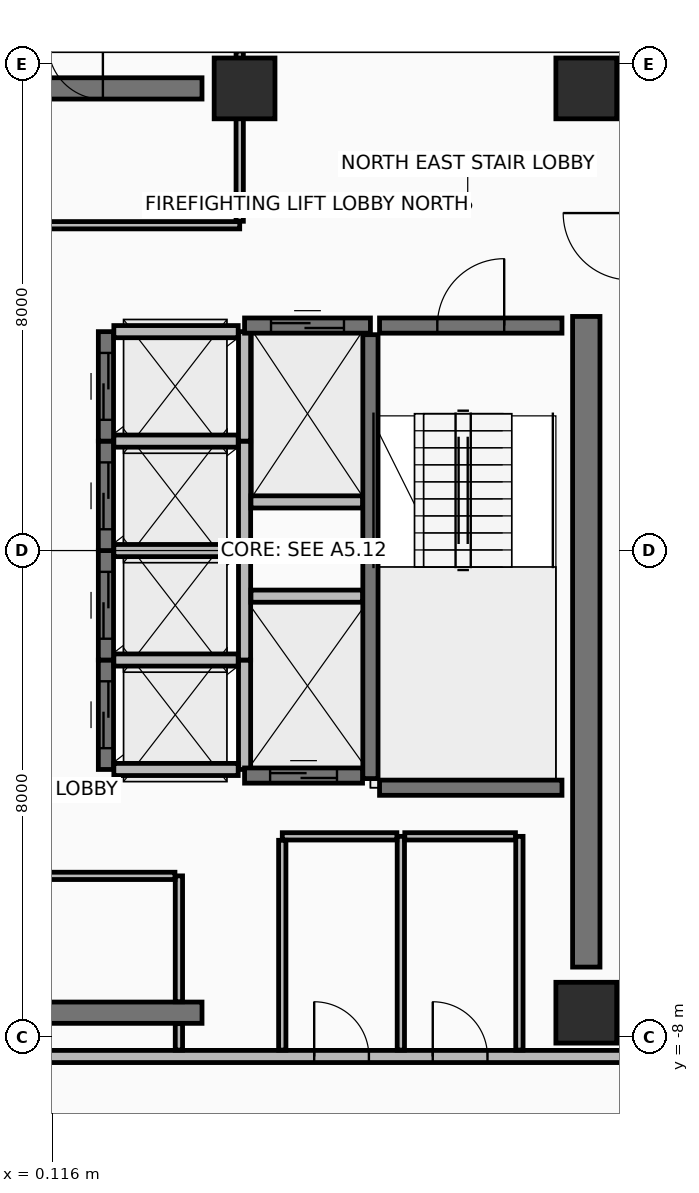
"""IFC4 building model, lengths in metres.
Left out: names, types, materials, properties, quantities, classifications, styles, units other than length and angle.
Written with IfcOpenShell. Run it as: python <this file> out.ifc"""

import sys

from ifc_helpers import new_model, si_unit, direction, frame, frame_2d, origin, origin_2d, place, context, subcontext, project, spatial, rectangle, extrude, element, fill, save


model = new_model("IFC4")
c1 = context("Model", 3, precision=1e-05, world=origin(), true_north=direction((0.0, 1.0)))
c2 = subcontext(c1, "Body", "Model", "MODEL_VIEW")
j1 = project(units=[si_unit("LENGTHUNIT", "METRE"), si_unit("PLANEANGLEUNIT", "RADIAN")], contexts=[c1])
p1 = place(None, origin())
s1 = spatial("IfcSite", under=j1, at=p1, CompositionType="ELEMENT")
p2 = place(p1, origin())
s2 = spatial("IfcBuilding", under=s1, at=p2, CompositionType="ELEMENT")
p3 = place(p2, frame((0.0, 0.0, 253.4)))
s3 = spatial("IfcBuildingStorey", under=s2, at=p3, CompositionType="ELEMENT", Elevation=253.4)
for number, where, z_axis, x_axis in (
    (1, (8.9, -7.6, 0.0), (0.0, 0.0, 1.0), (1.0, 0.0, 0.0)),
    (2, (8.9, 7.6, 0.0), (0.0, 0.0, 1.0), (1.0, 0.0, 0.0)),
    (3, (3.28, 7.6, 0.0), (0.0, 0.0, 1.0), (1.0, 0.0, 0.0)),
):
    element("IfcColumn", number, at=place(p3, frame(where, z_axis=z_axis, x_axis=x_axis)), inside=s3, PredefinedType="COLUMN", context=c2, shape_type="SweptSolid", body=[
        extrude(rectangle(XDim=1.0, YDim=1.0, at=origin_2d()), origin(), (0.0, 0.0, 1.0), 3.6),
    ])
for number, where, z_axis, x_axis in (
    (4, (-2.8, -7.6, 0.0), (0.0, 0.0, 1.0), (1.0, 0.0, 0.0)),
    (5, (-2.8, 7.6, 0.0), (0.0, 0.0, 1.0), (1.0, 0.0, 0.0)),
):
    element("IfcWall", number, at=place(p3, frame(where, z_axis=z_axis, x_axis=x_axis)), inside=s3, PredefinedType="SHEAR", context=c2, shape_type="SweptSolid", body=[
        extrude(rectangle(XDim=5.38, YDim=0.35, at=frame_2d((2.69, 0.0))), origin(), (0.0, 0.0, 1.0), 3.42),
    ])
p4 = place(p3, frame((8.9, -6.85, 0.0), z_axis=(0.0, 0.0, 1.0), x_axis=(0.0, 1.0, 0.0)))
e6 = element("IfcWall", 6, at=p4, inside=s3, PredefinedType="SHEAR", context=c2, shape_type="SweptSolid", body=[
    extrude(rectangle(XDim=10.7, YDim=0.45, at=frame_2d((5.35, 0.0))), origin(), (0.0, 0.0, 1.0), 3.42),
])
p5 = place(p3, frame((-9.62, -8.32, 0.0), z_axis=(0.0, 0.0, 1.0), x_axis=(1.0, 0.0, 0.0)))
e7 = element("IfcWall", 7, at=p5, inside=s3, PredefinedType="PARTITIONING", context=c2, shape_type="SweptSolid", body=[
    extrude(rectangle(XDim=19.24, YDim=0.2, at=frame_2d((9.62, 0.0))), origin(), (0.0, 0.0, 1.0), 2.915),
])
p6 = place(p5, frame((8.57, 0.0, 0.0)))
e8 = element("IfcOpeningElement", 8, at=p6, cuts=e7, PredefinedType="OPENING", context=c2, shape_type="SweptSolid", body=[
    extrude(rectangle(XDim=0.9, YDim=2.1, at=frame_2d((0.45, 1.05))), frame((0.0, 0.11, 0.0), z_axis=(0.0, -1.0, 0.0), x_axis=(1.0, 0.0, 0.0)), (0.0, 0.0, 1.0), 0.22),
])
p7 = place(p5, frame((14.045, 0.0, 0.0)))
e9 = element("IfcOpeningElement", 9, at=p7, cuts=e7, PredefinedType="OPENING", context=c2, shape_type="SweptSolid", body=[
    extrude(rectangle(XDim=0.9, YDim=2.1, at=frame_2d((0.45, 1.05))), frame((0.0, 0.11, 0.0), z_axis=(0.0, -1.0, 0.0), x_axis=(1.0, 0.0, 0.0)), (0.0, 0.0, 1.0), 0.22),
])
p8 = place(p5, frame((15.995, 0.0, 0.0)))
e10 = element("IfcOpeningElement", 10, at=p8, cuts=e7, PredefinedType="OPENING", context=c2, shape_type="SweptSolid", body=[
    extrude(rectangle(XDim=0.9, YDim=2.1, at=frame_2d((0.45, 1.05))), frame((0.0, 0.11, 0.0), z_axis=(0.0, -1.0, 0.0), x_axis=(1.0, 0.0, 0.0)), (0.0, 0.0, 1.0), 0.22),
])
p9 = place(p3, frame((5.35, -3.75, 0.0), z_axis=(0.0, 0.0, 1.0), x_axis=(0.0, 1.0, 0.0)))
e11 = element("IfcWall", 11, at=p9, inside=s3, PredefinedType="SHEAR", context=c2, shape_type="SweptSolid", body=[
    extrude(rectangle(XDim=7.3, YDim=0.25, at=frame_2d((3.65, 0.0))), origin(), (0.0, 0.0, 1.0), 3.42),
])
p10 = place(p3, frame((5.5, 3.7, 0.0), z_axis=(0.0, 0.0, 1.0), x_axis=(1.0, 0.0, 0.0)))
e12 = element("IfcWall", 12, at=p10, inside=s3, PredefinedType="SHEAR", context=c2, shape_type="SweptSolid", body=[
    extrude(rectangle(XDim=3.0, YDim=0.25, at=frame_2d((1.5, 0.0))), origin(), (0.0, 0.0, 1.0), 3.42),
])
p11 = place(p10, frame((0.95, 0.0, 0.0)))
e13 = element("IfcOpeningElement", 13, at=p11, cuts=e12, PredefinedType="OPENING", context=c2, shape_type="SweptSolid", body=[
    extrude(rectangle(XDim=1.1, YDim=2.15, at=frame_2d((0.55, 1.075))), frame((0.0, 0.135, 0.0), z_axis=(0.0, -1.0, 0.0), x_axis=(1.0, 0.0, 0.0)), (0.0, 0.0, 1.0), 0.27),
])
p12 = place(p3, frame((5.5, -3.9, 0.0), z_axis=(0.0, 0.0, 1.0), x_axis=(1.0, 0.0, 0.0)))
e14 = element("IfcWall", 14, at=p12, inside=s3, PredefinedType="SHEAR", context=c2, shape_type="SweptSolid", body=[
    extrude(rectangle(XDim=3.0, YDim=0.25, at=frame_2d((1.5, 0.0))), origin(), (0.0, 0.0, 1.0), 3.42),
])
p13 = place(p3, frame((1.0, -3.6, 0.0), z_axis=(0.0, 0.0, 1.0), x_axis=(0.0, 1.0, 0.0)))
e15 = element("IfcWall", 15, at=p13, inside=s3, PredefinedType="SHEAR", context=c2, shape_type="SweptSolid", body=[
    extrude(rectangle(XDim=1.8, YDim=0.25, at=frame_2d((0.9, 0.0))), origin(), (0.0, 0.0, 1.0), 3.42),
])
p14 = place(p13, frame((0.35, 0.0, 0.0)))
e16 = element("IfcOpeningElement", 16, at=p14, cuts=e15, PredefinedType="OPENING", context=c2, shape_type="SweptSolid", body=[
    extrude(rectangle(XDim=1.1, YDim=2.2, at=frame_2d((0.55, 1.1))), frame((0.0, 0.135, 0.0), z_axis=(0.0, -1.0, 0.0), x_axis=(1.0, 0.0, 0.0)), (0.0, 0.0, 1.0), 0.27),
])
p15 = place(p3, frame((3.28, -3.6, 0.0), z_axis=(0.0, 0.0, 1.0), x_axis=(0.0, 1.0, 0.0)))
e17 = element("IfcWall", 17, at=p15, inside=s3, PredefinedType="PARTITIONING", context=c2, shape_type="SweptSolid", body=[
    extrude(rectangle(XDim=1.8, YDim=0.2, at=frame_2d((0.9, 0.0))), origin(), (0.0, 0.0, 1.0), 3.42),
])
for number, where, z_axis, x_axis in (
    (18, (1.13, -3.6, 0.0), (0.0, 0.0, 1.0), (1.0, 0.0, 0.0)),
    (19, (1.13, -1.8, 0.0), (0.0, 0.0, 1.0), (1.0, 0.0, 0.0)),
):
    element("IfcWall", number, at=place(p3, frame(where, z_axis=z_axis, x_axis=x_axis)), inside=s3, PredefinedType="PARTITIONING", context=c2, shape_type="SweptSolid", body=[
        extrude(rectangle(XDim=2.045, YDim=0.2, at=frame_2d((1.022, 0.0))), origin(), (0.0, 0.0, 1.0), 3.42),
    ])
p16 = place(p3, frame((1.0, -1.8, 0.0), z_axis=(0.0, 0.0, 1.0), x_axis=(0.0, 1.0, 0.0)))
e20 = element("IfcWall", 20, at=p16, inside=s3, PredefinedType="SHEAR", context=c2, shape_type="SweptSolid", body=[
    extrude(rectangle(XDim=1.8, YDim=0.25, at=frame_2d((0.9, 0.0))), origin(), (0.0, 0.0, 1.0), 3.42),
])
p17 = place(p16, frame((0.35, 0.0, 0.0)))
e21 = element("IfcOpeningElement", 21, at=p17, cuts=e20, PredefinedType="OPENING", context=c2, shape_type="SweptSolid", body=[
    extrude(rectangle(XDim=1.1, YDim=2.2, at=frame_2d((0.55, 1.1))), frame((0.0, 0.135, 0.0), z_axis=(0.0, -1.0, 0.0), x_axis=(1.0, 0.0, 0.0)), (0.0, 0.0, 1.0), 0.27),
])
p18 = place(p3, frame((3.28, -1.8, 0.0), z_axis=(0.0, 0.0, 1.0), x_axis=(0.0, 1.0, 0.0)))
e22 = element("IfcWall", 22, at=p18, inside=s3, PredefinedType="PARTITIONING", context=c2, shape_type="SweptSolid", body=[
    extrude(rectangle(XDim=1.8, YDim=0.2, at=frame_2d((0.9, 0.0))), origin(), (0.0, 0.0, 1.0), 3.42),
])
p19 = place(p3, frame((1.13, 0.0, 0.0), z_axis=(0.0, 0.0, 1.0), x_axis=(1.0, 0.0, 0.0)))
e23 = element("IfcWall", 23, at=p19, inside=s3, PredefinedType="PARTITIONING", context=c2, shape_type="SweptSolid", body=[
    extrude(rectangle(XDim=2.045, YDim=0.2, at=frame_2d((1.022, 0.0))), origin(), (0.0, 0.0, 1.0), 3.42),
])
p20 = place(p3, frame((1.0, 0.0, 0.0), z_axis=(0.0, 0.0, 1.0), x_axis=(0.0, 1.0, 0.0)))
e24 = element("IfcWall", 24, at=p20, inside=s3, PredefinedType="SHEAR", context=c2, shape_type="SweptSolid", body=[
    extrude(rectangle(XDim=1.8, YDim=0.25, at=frame_2d((0.9, 0.0))), origin(), (0.0, 0.0, 1.0), 3.42),
])
p21 = place(p20, frame((0.35, 0.0, 0.0)))
e25 = element("IfcOpeningElement", 25, at=p21, cuts=e24, PredefinedType="OPENING", context=c2, shape_type="SweptSolid", body=[
    extrude(rectangle(XDim=1.1, YDim=2.2, at=frame_2d((0.55, 1.1))), frame((0.0, 0.135, 0.0), z_axis=(0.0, -1.0, 0.0), x_axis=(1.0, 0.0, 0.0)), (0.0, 0.0, 1.0), 0.27),
])
p22 = place(p3, frame((3.28, 0.0, 0.0), z_axis=(0.0, 0.0, 1.0), x_axis=(0.0, 1.0, 0.0)))
e26 = element("IfcWall", 26, at=p22, inside=s3, PredefinedType="PARTITIONING", context=c2, shape_type="SweptSolid", body=[
    extrude(rectangle(XDim=1.8, YDim=0.2, at=frame_2d((0.9, 0.0))), origin(), (0.0, 0.0, 1.0), 3.42),
])
p23 = place(p3, frame((1.13, 1.8, 0.0), z_axis=(0.0, 0.0, 1.0), x_axis=(1.0, 0.0, 0.0)))
e27 = element("IfcWall", 27, at=p23, inside=s3, PredefinedType="PARTITIONING", context=c2, shape_type="SweptSolid", body=[
    extrude(rectangle(XDim=2.045, YDim=0.2, at=frame_2d((1.022, 0.0))), origin(), (0.0, 0.0, 1.0), 3.42),
])
p24 = place(p3, frame((1.0, 1.8, 0.0), z_axis=(0.0, 0.0, 1.0), x_axis=(0.0, 1.0, 0.0)))
e28 = element("IfcWall", 28, at=p24, inside=s3, PredefinedType="SHEAR", context=c2, shape_type="SweptSolid", body=[
    extrude(rectangle(XDim=1.8, YDim=0.25, at=frame_2d((0.9, 0.0))), origin(), (0.0, 0.0, 1.0), 3.42),
])
p25 = place(p24, frame((0.35, 0.0, 0.0)))
e29 = element("IfcOpeningElement", 29, at=p25, cuts=e28, PredefinedType="OPENING", context=c2, shape_type="SweptSolid", body=[
    extrude(rectangle(XDim=1.1, YDim=2.2, at=frame_2d((0.55, 1.1))), frame((0.0, 0.135, 0.0), z_axis=(0.0, -1.0, 0.0), x_axis=(1.0, 0.0, 0.0)), (0.0, 0.0, 1.0), 0.27),
])
p26 = place(p3, frame((3.28, 1.8, 0.0), z_axis=(0.0, 0.0, 1.0), x_axis=(0.0, 1.0, 0.0)))
e30 = element("IfcWall", 30, at=p26, inside=s3, PredefinedType="PARTITIONING", context=c2, shape_type="SweptSolid", body=[
    extrude(rectangle(XDim=1.8, YDim=0.2, at=frame_2d((0.9, 0.0))), origin(), (0.0, 0.0, 1.0), 3.42),
])
p27 = place(p3, frame((1.13, 3.6, 0.0), z_axis=(0.0, 0.0, 1.0), x_axis=(1.0, 0.0, 0.0)))
e31 = element("IfcWall", 31, at=p27, inside=s3, PredefinedType="PARTITIONING", context=c2, shape_type="SweptSolid", body=[
    extrude(rectangle(XDim=2.045, YDim=0.2, at=frame_2d((1.022, 0.0))), origin(), (0.0, 0.0, 1.0), 2.715),
])
p28 = place(p3, frame((3.28, 3.7, 0.0), z_axis=(0.0, 0.0, 1.0), x_axis=(1.0, 0.0, 0.0)))
e32 = element("IfcWall", 32, at=p28, inside=s3, PredefinedType="SHEAR", context=c2, shape_type="SweptSolid", body=[
    extrude(rectangle(XDim=2.07, YDim=0.25, at=frame_2d((1.035, 0.0))), origin(), (0.0, 0.0, 1.0), 3.42),
])
p29 = place(p28, frame((0.435, 0.0, 0.0)))
e33 = element("IfcOpeningElement", 33, at=p29, cuts=e32, PredefinedType="OPENING", context=c2, shape_type="SweptSolid", body=[
    extrude(rectangle(XDim=1.2, YDim=2.2, at=frame_2d((0.6, 1.1))), frame((0.0, 0.135, 0.0), z_axis=(0.0, -1.0, 0.0), x_axis=(1.0, 0.0, 0.0)), (0.0, 0.0, 1.0), 0.27),
])
p30 = place(p3, frame((3.385, 0.8, 0.0), z_axis=(0.0, 0.0, 1.0), x_axis=(1.0, 0.0, 0.0)))
e34 = element("IfcWall", 34, at=p30, inside=s3, PredefinedType="PARTITIONING", context=c2, shape_type="SweptSolid", body=[
    extrude(rectangle(XDim=1.835, YDim=0.2, at=frame_2d((0.917, 0.0))), origin(), (0.0, 0.0, 1.0), 3.42),
])
p31 = place(p3, frame((3.28, -3.7, 0.0), z_axis=(0.0, 0.0, 1.0), x_axis=(1.0, 0.0, 0.0)))
e35 = element("IfcWall", 35, at=p31, inside=s3, PredefinedType="SHEAR", context=c2, shape_type="SweptSolid", body=[
    extrude(rectangle(XDim=1.94, YDim=0.25, at=frame_2d((0.97, 0.0))), origin(), (0.0, 0.0, 1.0), 3.42),
])
p32 = place(p31, frame((0.42, 0.0, 0.0)))
e36 = element("IfcOpeningElement", 36, at=p32, cuts=e35, PredefinedType="OPENING", context=c2, shape_type="SweptSolid", body=[
    extrude(rectangle(XDim=1.1, YDim=2.2, at=frame_2d((0.55, 1.1))), frame((0.0, 0.135, 0.0), z_axis=(0.0, -1.0, 0.0), x_axis=(1.0, 0.0, 0.0)), (0.0, 0.0, 1.0), 0.27),
])
p33 = place(p3, frame((3.385, -0.75, 0.0), z_axis=(0.0, 0.0, 1.0), x_axis=(1.0, 0.0, 0.0)))
e37 = element("IfcWall", 37, at=p33, inside=s3, PredefinedType="PARTITIONING", context=c2, shape_type="SweptSolid", body=[
    extrude(rectangle(XDim=1.835, YDim=0.2, at=frame_2d((0.917, 0.0))), origin(), (0.0, 0.0, 1.0), 3.42),
])
p34 = place(p3, frame((2.2, -8.215, 0.0), z_axis=(0.0, 0.0, 1.0), x_axis=(0.0, 1.0, 0.0)))
e38 = element("IfcWall", 38, at=p34, inside=s3, PredefinedType="PARTITIONING", context=c2, shape_type="SweptSolid", body=[
    extrude(rectangle(XDim=0.435, YDim=0.12, at=frame_2d((0.218, 0.0))), origin(), (0.0, 0.0, 1.0), 2.715),
])
p35 = place(p3, frame((2.2, -7.42, 0.0), z_axis=(0.0, 0.0, 1.0), x_axis=(0.0, 1.0, 0.0)))
e39 = element("IfcWall", 39, at=p35, inside=s3, PredefinedType="PARTITIONING", context=c2, shape_type="SweptSolid", body=[
    extrude(rectangle(XDim=2.07, YDim=0.12, at=frame_2d((1.035, 0.0))), origin(), (0.0, 0.0, 1.0), 2.715),
])
p36 = place(p3, frame((2.135, -5.35, 0.0), z_axis=(0.0, 0.0, 1.0), x_axis=(-1.0, 0.0, 0.0)))
e40 = element("IfcWall", 40, at=p36, inside=s3, PredefinedType="PARTITIONING", context=c2, shape_type="SweptSolid", body=[
    extrude(rectangle(XDim=5.535, YDim=0.12, at=frame_2d((2.768, 0.0))), origin(), (0.0, 0.0, 1.0), 2.715),
])
p37 = place(p3, frame((-2.2, 5.35, 0.0), z_axis=(0.0, 0.0, 1.0), x_axis=(1.0, 0.0, 0.0)))
e41 = element("IfcWall", 41, at=p37, inside=s3, PredefinedType="PARTITIONING", context=c2, shape_type="SweptSolid", body=[
    extrude(rectangle(XDim=5.4, YDim=0.12, at=frame_2d((2.7, 0.0))), origin(), (0.0, 0.0, 1.0), 2.715),
])
p38 = place(p3, frame((3.2, 5.415, 0.0), z_axis=(0.0, 0.0, 1.0), x_axis=(0.0, 1.0, 0.0)))
e42 = element("IfcWall", 42, at=p38, inside=s3, PredefinedType="PARTITIONING", context=c2, shape_type="SweptSolid", body=[
    extrude(rectangle(XDim=2.8, YDim=0.12, at=frame_2d((1.4, 0.0))), origin(), (0.0, 0.0, 1.0), 2.715),
])
p39 = place(p3, frame((5.85, -8.215, 0.0), z_axis=(0.0, 0.0, 1.0), x_axis=(0.0, 1.0, 0.0)))
e43 = element("IfcWall", 43, at=p39, inside=s3, PredefinedType="PARTITIONING", context=c2, shape_type="SweptSolid", body=[
    extrude(rectangle(XDim=3.515, YDim=0.12, at=frame_2d((1.758, 0.0))), origin(), (0.0, 0.0, 1.0), 2.715),
])
p40 = place(p3, frame((5.785, -4.7, 0.0), z_axis=(0.0, 0.0, 1.0), x_axis=(-1.0, 0.0, 0.0)))
e44 = element("IfcWall", 44, at=p40, inside=s3, PredefinedType="PARTITIONING", context=c2, shape_type="SweptSolid", body=[
    extrude(rectangle(XDim=1.885, YDim=0.12, at=frame_2d((0.942, 0.0))), origin(), (0.0, 0.0, 1.0), 3.42),
])
p41 = place(p3, frame((3.9, -4.765, 0.0), z_axis=(0.0, 0.0, 1.0), x_axis=(0.0, -1.0, 0.0)))
e45 = element("IfcWall", 45, at=p41, inside=s3, PredefinedType="PARTITIONING", context=c2, shape_type="SweptSolid", body=[
    extrude(rectangle(XDim=3.45, YDim=0.12, at=frame_2d((1.725, 0.0))), origin(), (0.0, 0.0, 1.0), 2.715),
])
p42 = place(p3, frame((7.8, -8.215, 0.0), z_axis=(0.0, 0.0, 1.0), x_axis=(0.0, 1.0, 0.0)))
e46 = element("IfcWall", 46, at=p42, inside=s3, PredefinedType="PARTITIONING", context=c2, shape_type="SweptSolid", body=[
    extrude(rectangle(XDim=3.515, YDim=0.12, at=frame_2d((1.758, 0.0))), origin(), (0.0, 0.0, 1.0), 2.715),
])
p43 = place(p3, frame((7.735, -4.7, 0.0), z_axis=(0.0, 0.0, 1.0), x_axis=(-1.0, 0.0, 0.0)))
e47 = element("IfcWall", 47, at=p43, inside=s3, PredefinedType="PARTITIONING", context=c2, shape_type="SweptSolid", body=[
    extrude(rectangle(XDim=1.82, YDim=0.12, at=frame_2d((0.91, 0.0))), origin(), (0.0, 0.0, 1.0), 3.42),
])
p44 = place(p11, frame((1.1, 0.0, 0.0), z_axis=(0.0, 0.0, 1.0), x_axis=(-1.0, 0.0, 0.0)))
e48 = element("IfcDoor", 48, at=p44, inside=s3, OperationType="SINGLE_SWING_LEFT", PredefinedType="DOOR", context=c2, shape_type="SweptSolid", body=[
    extrude(rectangle(XDim=1.1, YDim=2.15, at=frame_2d((0.55, 1.075))), frame((0.0, 0.025, 0.0), z_axis=(0.0, -1.0, 0.0), x_axis=(1.0, 0.0, 0.0)), (0.0, 0.0, 1.0), 0.05),
])
fill(e13, e48)
p45 = place(p14, origin())
e49 = element("IfcDoor", 49, at=p45, inside=s3, OperationType="SLIDING_TO_LEFT", PredefinedType="DOOR", context=c2, shape_type="SweptSolid", body=[
    extrude(rectangle(XDim=1.1, YDim=2.2, at=frame_2d((0.55, 1.1))), frame((0.0, 0.025, 0.0), z_axis=(0.0, -1.0, 0.0), x_axis=(1.0, 0.0, 0.0)), (0.0, 0.0, 1.0), 0.05),
])
fill(e16, e49)
p46 = place(p17, origin())
e50 = element("IfcDoor", 50, at=p46, inside=s3, OperationType="SLIDING_TO_LEFT", PredefinedType="DOOR", context=c2, shape_type="SweptSolid", body=[
    extrude(rectangle(XDim=1.1, YDim=2.2, at=frame_2d((0.55, 1.1))), frame((0.0, 0.025, 0.0), z_axis=(0.0, -1.0, 0.0), x_axis=(1.0, 0.0, 0.0)), (0.0, 0.0, 1.0), 0.05),
])
fill(e21, e50)
p47 = place(p21, origin())
e51 = element("IfcDoor", 51, at=p47, inside=s3, OperationType="SLIDING_TO_LEFT", PredefinedType="DOOR", context=c2, shape_type="SweptSolid", body=[
    extrude(rectangle(XDim=1.1, YDim=2.2, at=frame_2d((0.55, 1.1))), frame((0.0, 0.025, 0.0), z_axis=(0.0, -1.0, 0.0), x_axis=(1.0, 0.0, 0.0)), (0.0, 0.0, 1.0), 0.05),
])
fill(e25, e51)
p48 = place(p25, origin())
e52 = element("IfcDoor", 52, at=p48, inside=s3, OperationType="SLIDING_TO_LEFT", PredefinedType="DOOR", context=c2, shape_type="SweptSolid", body=[
    extrude(rectangle(XDim=1.1, YDim=2.2, at=frame_2d((0.55, 1.1))), frame((0.0, 0.025, 0.0), z_axis=(0.0, -1.0, 0.0), x_axis=(1.0, 0.0, 0.0)), (0.0, 0.0, 1.0), 0.05),
])
fill(e29, e52)
p49 = place(p29, origin())
e53 = element("IfcDoor", 53, at=p49, inside=s3, OperationType="SLIDING_TO_RIGHT", PredefinedType="DOOR", context=c2, shape_type="SweptSolid", body=[
    extrude(rectangle(XDim=1.2, YDim=2.2, at=frame_2d((0.6, 1.1))), frame((0.0, 0.025, 0.0), z_axis=(0.0, -1.0, 0.0), x_axis=(1.0, 0.0, 0.0)), (0.0, 0.0, 1.0), 0.05),
])
fill(e33, e53)
p50 = place(p32, origin())
e54 = element("IfcDoor", 54, at=p50, inside=s3, OperationType="SLIDING_TO_LEFT", PredefinedType="DOOR", context=c2, shape_type="SweptSolid", body=[
    extrude(rectangle(XDim=1.1, YDim=2.2, at=frame_2d((0.55, 1.1))), frame((0.0, 0.025, 0.0), z_axis=(0.0, -1.0, 0.0), x_axis=(1.0, 0.0, 0.0)), (0.0, 0.0, 1.0), 0.05),
])
fill(e36, e54)
p51 = place(p7, origin())
e55 = element("IfcDoor", 55, at=p51, inside=s3, OperationType="SINGLE_SWING_LEFT", PredefinedType="DOOR", context=c2, shape_type="SweptSolid", body=[
    extrude(rectangle(XDim=0.9, YDim=2.1, at=frame_2d((0.45, 1.05))), frame((0.0, 0.025, 0.0), z_axis=(0.0, -1.0, 0.0), x_axis=(1.0, 0.0, 0.0)), (0.0, 0.0, 1.0), 0.05),
])
fill(e9, e55)
p52 = place(p8, origin())
e56 = element("IfcDoor", 56, at=p52, inside=s3, OperationType="SINGLE_SWING_LEFT", PredefinedType="DOOR", context=c2, shape_type="SweptSolid", body=[
    extrude(rectangle(XDim=0.9, YDim=2.1, at=frame_2d((0.45, 1.05))), frame((0.0, 0.025, 0.0), z_axis=(0.0, -1.0, 0.0), x_axis=(1.0, 0.0, 0.0)), (0.0, 0.0, 1.0), 0.05),
])
fill(e10, e56)
save(model, sys.argv[1])
